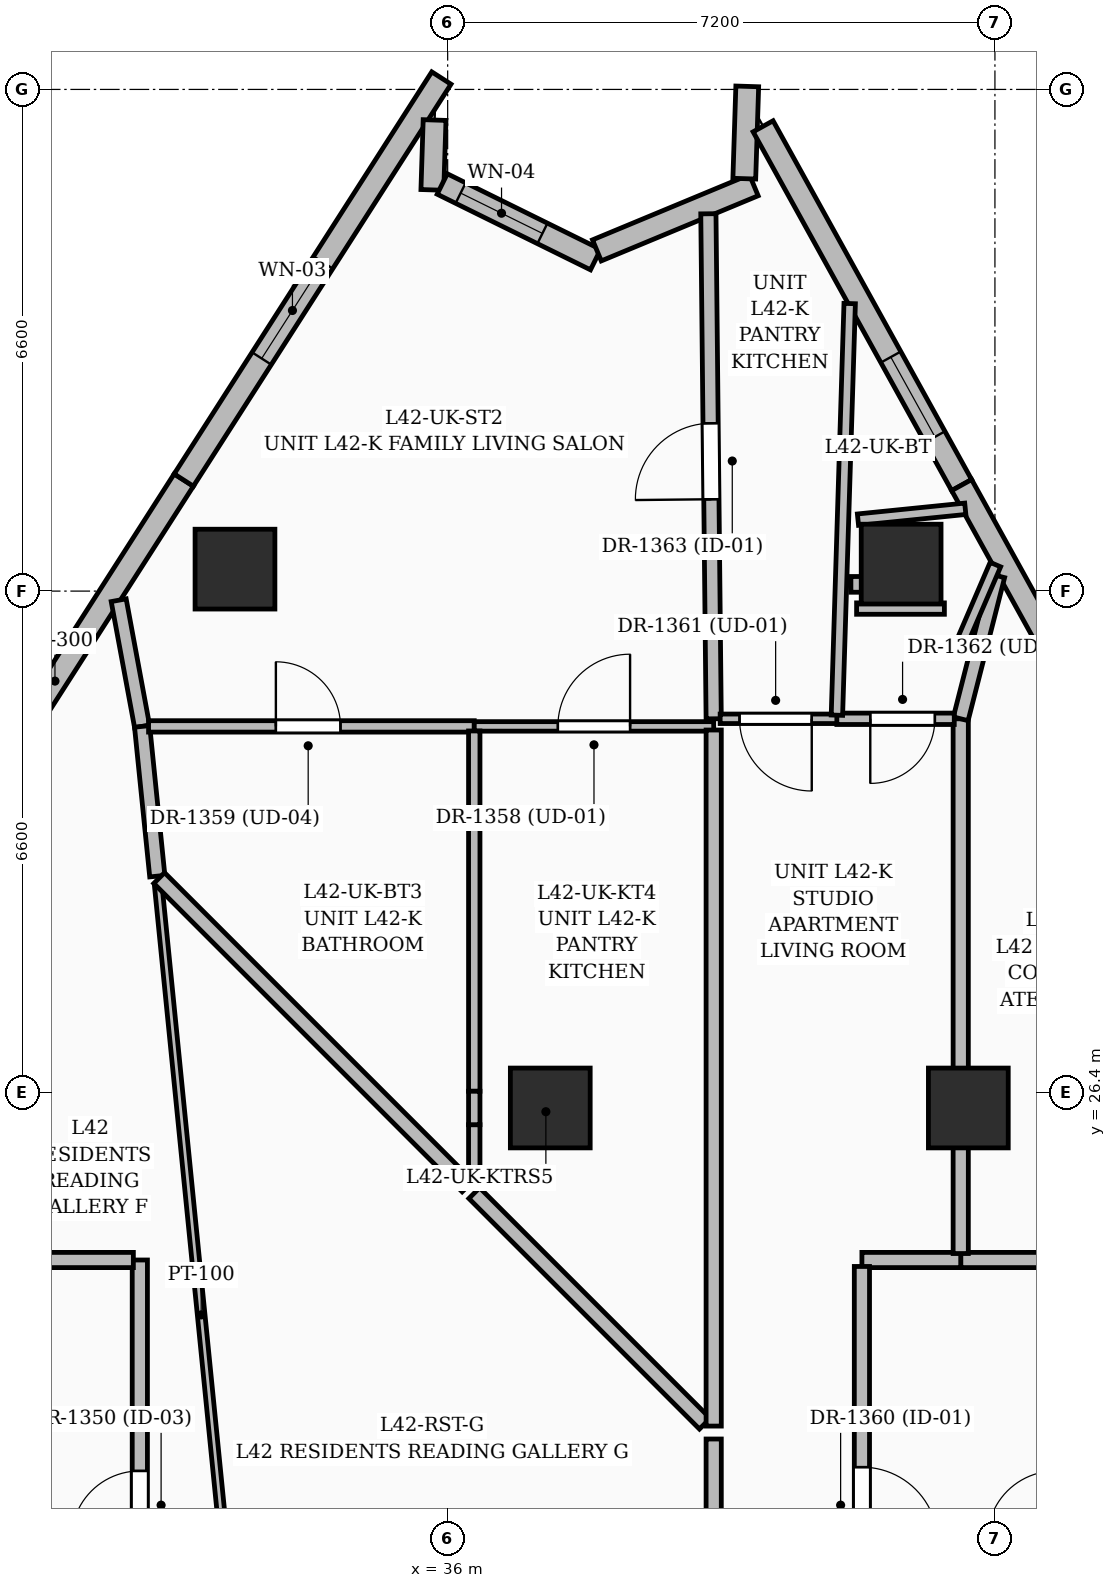
"""IFC4 building model, lengths in metres.
Left out: names, types, materials, properties, quantities, classifications, styles, units other than length and angle.
Written with IfcOpenShell. Run it as: python <this file> out.ifc"""

import sys

from ifc_helpers import new_model, si_unit, direction, frame, frame_2d, origin, origin_2d, place, context, subcontext, project, spatial, rectangle, extrude, element, fill, save


model = new_model("IFC4")
c1 = context("Model", 3, precision=1e-05, world=origin(), true_north=direction((0.0, 1.0)))
c2 = subcontext(c1, "Body", "Model", "MODEL_VIEW")
j1 = project(units=[si_unit("LENGTHUNIT", "METRE"), si_unit("PLANEANGLEUNIT", "RADIAN")], contexts=[c1])
p1 = place(None, origin())
s1 = spatial("IfcSite", under=j1, at=p1, CompositionType="ELEMENT")
p2 = place(p1, origin())
s2 = spatial("IfcBuilding", under=s1, at=p2, CompositionType="ELEMENT")
p3 = place(p2, frame((0.0, 0.0, 164.4)))
s3 = spatial("IfcBuildingStorey", under=s2, at=p3, CompositionType="ELEMENT", Elevation=164.4)
for number, where, z_axis, x_axis in (
    (1, (42.85, 26.2, 0.0), (0.0, 0.0, 1.0), (1.0, 0.0, 0.0)),
    (2, (37.35, 26.2, 0.0), (0.0, 0.0, 1.0), (1.0, 0.0, 0.0)),
    (3, (41.966, 33.355, 0.0), (0.0, 0.0, 1.0), (1.0, 0.0, 0.0)),
    (4, (33.202, 33.289, 0.0), (0.0, 0.0, 1.0), (1.0, 0.0, 0.0)),
):
    element("IfcColumn", number, at=place(p3, frame(where, z_axis=z_axis, x_axis=x_axis)), inside=s3, PredefinedType="COLUMN", context=c2, shape_type="SweptSolid", body=[
        extrude(rectangle(XDim=1.05, YDim=1.05, at=origin_2d()), origin(), (0.0, 0.0, 1.0), 3.6),
    ])
p4 = place(p3, frame((29.139, 29.171, 0.0), z_axis=(0.0, 0.0, 1.0), x_axis=(0.539533329528, 0.841964242904, 0.0)))
e5 = element("IfcWall", 5, at=p4, inside=s3, PredefinedType="SOLIDWALL", context=c2, shape_type="SweptSolid", body=[
    extrude(rectangle(XDim=6.282, YDim=0.3, at=frame_2d((3.141, 0.0))), origin(), (0.0, 0.0, 1.0), 3.35),
])
p5 = place(p3, frame((32.528, 34.461, 0.0), z_axis=(0.0, 0.0, 1.0), x_axis=(0.539505778621, 0.841981896976, 0.0)))
e6 = element("IfcWall", 6, at=p5, inside=s3, PredefinedType="SOLIDWALL", context=c2, shape_type="SweptSolid", body=[
    extrude(rectangle(XDim=6.282, YDim=0.3, at=frame_2d((3.141, 0.0))), origin(), (0.0, 0.0, 1.0), 3.35),
])
p6 = place(p5, frame((1.9, 0.0, 0.6)))
e7 = element("IfcOpeningElement", 7, at=p6, cuts=e6, PredefinedType="OPENING", context=c2, shape_type="SweptSolid", body=[
    extrude(rectangle(XDim=1.5, YDim=2.1, at=frame_2d((0.75, 1.05))), frame((0.0, 0.16, 0.0), z_axis=(0.0, -1.0, 0.0), x_axis=(1.0, 0.0, 0.0)), (0.0, 0.0, 1.0), 0.32),
])
p7 = place(p3, frame((35.828, 39.197, 0.0), z_axis=(0.0, 0.0, 1.0), x_axis=(-0.03185633333, -0.999492458214, 0.0)))
e8 = element("IfcWall", 8, at=p7, inside=s3, PredefinedType="SOLIDWALL", context=c2, shape_type="SweptSolid", body=[
    extrude(rectangle(XDim=0.92, YDim=0.3, at=frame_2d((0.46, 0.0))), origin(), (0.0, 0.0, 1.0), 3.35),
])
p8 = place(p3, frame((35.928, 38.356, 0.0), z_axis=(0.0, 0.0, 1.0), x_axis=(0.896845505116, -0.442343915922, 0.0)))
e9 = element("IfcWall", 9, at=p8, inside=s3, PredefinedType="SOLIDWALL", context=c2, shape_type="SweptSolid", body=[
    extrude(rectangle(XDim=2.249, YDim=0.3, at=frame_2d((1.125, 0.0))), origin(), (0.0, 0.0, 1.0), 3.35),
])
p9 = place(p8, frame((0.27, 0.0, 0.8)))
e10 = element("IfcOpeningElement", 10, at=p9, cuts=e9, PredefinedType="OPENING", context=c2, shape_type="SweptSolid", body=[
    extrude(rectangle(XDim=1.2, YDim=1.8, at=frame_2d((0.6, 0.9))), frame((0.0, 0.16, 0.0), z_axis=(0.0, -1.0, 0.0), x_axis=(1.0, 0.0, 0.0)), (0.0, 0.0, 1.0), 0.32),
])
p10 = place(p3, frame((37.963, 37.482, 0.0), z_axis=(0.0, 0.0, 1.0), x_axis=(0.923538383056, 0.383506003892, 0.0)))
e11 = element("IfcWall", 11, at=p10, inside=s3, PredefinedType="SOLIDWALL", context=c2, shape_type="SweptSolid", body=[
    extrude(rectangle(XDim=2.235, YDim=0.3, at=frame_2d((1.118, 0.0))), origin(), (0.0, 0.0, 1.0), 3.35),
])
p11 = place(p3, frame((39.903, 38.426, 0.0), z_axis=(0.0, 0.0, 1.0), x_axis=(0.031962743503, 0.999489060985, 0.0)))
e12 = element("IfcWall", 12, at=p11, inside=s3, PredefinedType="SOLIDWALL", context=c2, shape_type="SweptSolid", body=[
    extrude(rectangle(XDim=1.215, YDim=0.3, at=frame_2d((0.607, 0.0))), origin(), (0.0, 0.0, 1.0), 3.35),
])
p12 = place(p3, frame((40.15, 39.115, 0.0), z_axis=(0.0, 0.0, 1.0), x_axis=(0.484220621964, -0.874945935052, 0.0)))
e13 = element("IfcWall", 13, at=p12, inside=s3, PredefinedType="SOLIDWALL", context=c2, shape_type="SweptSolid", body=[
    extrude(rectangle(XDim=5.395, YDim=0.3, at=frame_2d((2.697, 0.0))), origin(), (0.0, 0.0, 1.0), 3.35),
])
p13 = place(p12, frame((3.47, 0.0, 0.8)))
e14 = element("IfcOpeningElement", 14, at=p13, cuts=e13, PredefinedType="OPENING", context=c2, shape_type="SweptSolid", body=[
    extrude(rectangle(XDim=1.2, YDim=1.8, at=frame_2d((0.6, 0.9))), frame((0.0, 0.16, 0.0), z_axis=(0.0, -1.0, 0.0), x_axis=(1.0, 0.0, 0.0)), (0.0, 0.0, 1.0), 0.32),
])
p14 = place(p3, frame((42.762, 34.395, 0.0), z_axis=(0.0, 0.0, 1.0), x_axis=(0.484157246346, -0.874981005972, 0.0)))
e15 = element("IfcWall", 15, at=p14, inside=s3, PredefinedType="SOLIDWALL", context=c2, shape_type="SweptSolid", body=[
    extrude(rectangle(XDim=5.974, YDim=0.3, at=frame_2d((2.987, 0.0))), origin(), (0.0, 0.0, 1.0), 3.35),
])
p15 = place(p14, frame((2.525, 0.0, 0.6)))
e16 = element("IfcOpeningElement", 16, at=p15, cuts=e15, PredefinedType="OPENING", context=c2, shape_type="SweptSolid", body=[
    extrude(rectangle(XDim=1.5, YDim=2.1, at=frame_2d((0.75, 1.05))), frame((0.0, 0.16, 0.0), z_axis=(0.0, -1.0, 0.0), x_axis=(1.0, 0.0, 0.0)), (0.0, 0.0, 1.0), 0.32),
])
p16 = place(p3, frame((31.95, 17.835, 0.0), z_axis=(0.0, 0.0, 1.0), x_axis=(0.0, 1.0, 0.0)))
e17 = element("IfcWall", 17, at=p16, inside=s3, PredefinedType="PARTITIONING", context=c2, shape_type="SweptSolid", body=[
    extrude(rectangle(XDim=6.365, YDim=0.2, at=frame_2d((3.183, 0.0))), origin(), (0.0, 0.0, 1.0), 2.393),
])
p17 = place(p16, frame((2.69, 0.0, 0.0)))
e18 = element("IfcOpeningElement", 18, at=p17, cuts=e17, PredefinedType="OPENING", context=c2, shape_type="SweptSolid", body=[
    extrude(rectangle(XDim=0.9, YDim=2.1, at=frame_2d((0.45, 1.05))), frame((0.0, 0.11, 0.0), z_axis=(0.0, -1.0, 0.0), x_axis=(1.0, 0.0, 0.0)), (0.0, 0.0, 1.0), 0.22),
])
p18 = place(p3, frame((31.865, 24.2, 0.0), z_axis=(0.0, 0.0, 1.0), x_axis=(-1.0, 0.0, 0.0)))
e19 = element("IfcWall", 19, at=p18, inside=s3, PredefinedType="PARTITIONING", context=c2, shape_type="SweptSolid", body=[
    extrude(rectangle(XDim=1.765, YDim=0.2, at=frame_2d((0.882, 0.0))), origin(), (0.0, 0.0, 1.0), 2.712),
])
p19 = place(p3, frame((43.915, 24.2, 0.0), z_axis=(0.0, 0.0, 1.0), x_axis=(-1.0, 0.0, 0.0)))
e20 = element("IfcWall", 20, at=p19, inside=s3, PredefinedType="PARTITIONING", context=c2, shape_type="SweptSolid", body=[
    extrude(rectangle(XDim=1.165, YDim=0.2, at=frame_2d((0.583, 0.0))), origin(), (0.0, 0.0, 1.0), 2.436),
])
p20 = place(p3, frame((42.75, 24.2, 0.0), z_axis=(0.0, 0.0, 1.0), x_axis=(-1.0, 0.0, 0.0)))
e21 = element("IfcWall", 21, at=p20, inside=s3, PredefinedType="PARTITIONING", context=c2, shape_type="SweptSolid", body=[
    extrude(rectangle(XDim=1.3, YDim=0.2, at=frame_2d((0.65, 0.0))), origin(), (0.0, 0.0, 1.0), 3.35),
])
p21 = place(p3, frame((41.45, 24.115, 0.0), z_axis=(0.0, 0.0, 1.0), x_axis=(0.0, -1.0, 0.0)))
e22 = element("IfcWall", 22, at=p21, inside=s3, PredefinedType="PARTITIONING", context=c2, shape_type="SweptSolid", body=[
    extrude(rectangle(XDim=6.365, YDim=0.2, at=frame_2d((3.183, 0.0))), origin(), (0.0, 0.0, 1.0), 3.35),
])
p22 = place(p21, frame((2.64, 0.0, 0.0)))
e23 = element("IfcOpeningElement", 23, at=p22, cuts=e22, PredefinedType="OPENING", context=c2, shape_type="SweptSolid", body=[
    extrude(rectangle(XDim=1.0, YDim=2.2, at=frame_2d((0.5, 1.1))), frame((0.0, 0.11, 0.0), z_axis=(0.0, -1.0, 0.0), x_axis=(1.0, 0.0, 0.0)), (0.0, 0.0, 1.0), 0.22),
])
p23 = place(p3, frame((33.322, 17.835, 0.0), z_axis=(0.0, 0.0, 1.0), x_axis=(-0.099510112586, 0.995036550833, 0.0)))
e24 = element("IfcWall", 24, at=p23, inside=s3, PredefinedType="PARTITIONING", context=c2, shape_type="SweptSolid", body=[
    extrude(rectangle(XDim=11.342, YDim=0.1, at=frame_2d((5.671, 0.0))), origin(), (0.0, 0.0, 1.0), 2.393),
])
p24 = place(p3, frame((31.98, 31.22, 0.0), z_axis=(0.0, 0.0, 1.0), x_axis=(-0.18235853501, 0.983232101138, 0.0)))
e25 = element("IfcWall", 25, at=p24, inside=s3, PredefinedType="PARTITIONING", context=c2, shape_type="SweptSolid", body=[
    extrude(rectangle(XDim=1.688, YDim=0.2, at=frame_2d((0.844, 0.0))), origin(), (0.0, 0.0, 1.0), 2.57),
])
p25 = place(p3, frame((32.18, 29.25, 0.0), z_axis=(0.0, 0.0, 1.0), x_axis=(-0.100980739114, 0.994888380839, 0.0)))
e26 = element("IfcWall", 26, at=p25, inside=s3, PredefinedType="PARTITIONING", context=c2, shape_type="SweptSolid", body=[
    extrude(rectangle(XDim=1.98, YDim=0.2, at=frame_2d((0.99, 0.0))), origin(), (0.0, 0.0, 1.0), 2.57),
])
p26 = place(p3, frame((36.262, 25.168, 0.0), z_axis=(0.0, 0.0, 1.0), x_axis=(-0.707128056834, 0.707085504899, 0.0)))
e27 = element("IfcWall", 27, at=p26, inside=s3, PredefinedType="PARTITIONING", context=c2, shape_type="SweptSolid", body=[
    extrude(rectangle(XDim=5.738, YDim=0.2, at=frame_2d((2.869, 0.0))), origin(), (0.0, 0.0, 1.0), 2.712),
])
p27 = place(p3, frame((39.383, 22.047, 0.0), z_axis=(0.0, 0.0, 1.0), x_axis=(-0.707078324468, 0.70713523676, 0.0)))
e28 = element("IfcWall", 28, at=p27, inside=s3, PredefinedType="PARTITIONING", context=c2, shape_type="SweptSolid", body=[
    extrude(rectangle(XDim=4.29, YDim=0.2, at=frame_2d((2.145, 0.0))), origin(), (0.0, 0.0, 1.0), 2.436),
])
p28 = place(p3, frame((39.5, 17.835, 0.0), z_axis=(0.0, 0.0, 1.0), x_axis=(0.0, 1.0, 0.0)))
e29 = element("IfcWall", 29, at=p28, inside=s3, PredefinedType="PARTITIONING", context=c2, shape_type="SweptSolid", body=[
    extrude(rectangle(XDim=4.01, YDim=0.2, at=frame_2d((2.005, 0.0))), origin(), (0.0, 0.0, 1.0), 3.35),
])
p29 = place(p3, frame((42.75, 31.32, 0.0), z_axis=(0.0, 0.0, 1.0), x_axis=(0.0, -1.0, 0.0)))
e30 = element("IfcWall", 30, at=p29, inside=s3, PredefinedType="PARTITIONING", context=c2, shape_type="SweptSolid", body=[
    extrude(rectangle(XDim=7.035, YDim=0.2, at=frame_2d((3.518, 0.0))), origin(), (0.0, 0.0, 1.0), 2.393),
])
p30 = place(p3, frame((43.23, 33.202, 0.0), z_axis=(0.0, 0.0, 1.0), x_axis=(-0.247413379041, -0.968910016396, 0.0)))
e31 = element("IfcWall", 31, at=p30, inside=s3, PredefinedType="PARTITIONING", context=c2, shape_type="SweptSolid", body=[
    extrude(rectangle(XDim=1.942, YDim=0.2, at=frame_2d((0.971, 0.0))), origin(), (0.0, 0.0, 1.0), 2.57),
])
p31 = place(p3, frame((32.065, 31.22, 0.0), z_axis=(0.0, 0.0, 1.0), x_axis=(1.0, 0.0, 0.0)))
e32 = element("IfcWall", 32, at=p31, inside=s3, PredefinedType="PARTITIONING", context=c2, shape_type="SweptSolid", body=[
    extrude(rectangle(XDim=4.285, YDim=0.15, at=frame_2d((2.143, 0.0))), origin(), (0.0, 0.0, 1.0), 2.393),
])
p32 = place(p31, frame((1.675, 0.0, 0.0)))
e33 = element("IfcOpeningElement", 33, at=p32, cuts=e32, PredefinedType="OPENING", context=c2, shape_type="SweptSolid", body=[
    extrude(rectangle(XDim=0.85, YDim=2.1, at=frame_2d((0.425, 1.05))), frame((0.0, 0.085, 0.0), z_axis=(0.0, -1.0, 0.0), x_axis=(1.0, 0.0, 0.0)), (0.0, 0.0, 1.0), 0.17),
])
p33 = place(p3, frame((36.35, 31.22, 0.0), z_axis=(0.0, 0.0, 1.0), x_axis=(1.0, 0.0, 0.0)))
e34 = element("IfcWall", 34, at=p33, inside=s3, PredefinedType="PARTITIONING", context=c2, shape_type="SweptSolid", body=[
    extrude(rectangle(XDim=3.15, YDim=0.125, at=frame_2d((1.575, 0.0))), origin(), (0.0, 0.0, 1.0), 2.712),
])
p34 = place(p33, frame((1.1, 0.0, 0.0)))
e35 = element("IfcOpeningElement", 35, at=p34, cuts=e34, PredefinedType="OPENING", context=c2, shape_type="SweptSolid", body=[
    extrude(rectangle(XDim=0.95, YDim=2.2, at=frame_2d((0.475, 1.1))), frame((0.0, 0.072, 0.0), z_axis=(0.0, -1.0, 0.0), x_axis=(1.0, 0.0, 0.0)), (0.0, 0.0, 1.0), 0.145),
])
p35 = place(p3, frame((39.5, 31.32, 0.0), z_axis=(0.0, 0.0, 1.0), x_axis=(-0.010545456067, 0.999944395132, 0.0)))
e36 = element("IfcWall", 36, at=p35, inside=s3, PredefinedType="PARTITIONING", context=c2, shape_type="SweptSolid", body=[
    extrude(rectangle(XDim=6.645, YDim=0.2, at=frame_2d((3.322, 0.0))), origin(), (0.0, 0.0, 1.0), 2.57),
])
p36 = place(p35, frame((2.889, 0.0, 0.0)))
e37 = element("IfcOpeningElement", 37, at=p36, cuts=e36, PredefinedType="OPENING", context=c2, shape_type="SweptSolid", body=[
    extrude(rectangle(XDim=1.0, YDim=2.2, at=frame_2d((0.5, 1.1))), frame((0.0, 0.11, 0.0), z_axis=(0.0, -1.0, 0.0), x_axis=(1.0, 0.0, 0.0)), (0.0, 0.0, 1.0), 0.22),
])
p37 = place(p3, frame((36.35, 25.165, 0.0), z_axis=(0.0, 0.0, 1.0), x_axis=(0.0, 1.0, 0.0)))
e38 = element("IfcWall", 38, at=p37, inside=s3, PredefinedType="PARTITIONING", context=c2, shape_type="SweptSolid", body=[
    extrude(rectangle(XDim=0.815, YDim=0.15, at=frame_2d((0.407, 0.0))), origin(), (0.0, 0.0, 1.0), 3.35),
])
p38 = place(p3, frame((36.35, 26.42, 0.0), z_axis=(0.0, 0.0, 1.0), x_axis=(0.0, 1.0, 0.0)))
e39 = element("IfcWall", 39, at=p38, inside=s3, PredefinedType="PARTITIONING", context=c2, shape_type="SweptSolid", body=[
    extrude(rectangle(XDim=4.74, YDim=0.15, at=frame_2d((2.37, 0.0))), origin(), (0.0, 0.0, 1.0), 2.393),
])
p39 = place(p3, frame((39.5, 22.015, 0.0), z_axis=(0.0, 0.0, 1.0), x_axis=(0.0, 1.0, 0.0)))
e40 = element("IfcWall", 40, at=p39, inside=s3, PredefinedType="PARTITIONING", context=c2, shape_type="SweptSolid", body=[
    extrude(rectangle(XDim=9.158, YDim=0.2, at=frame_2d((4.579, 0.0))), origin(), (0.0, 0.0, 1.0), 2.436),
])
p40 = place(p3, frame((41.13, 31.32, 0.0), z_axis=(0.0, 0.0, 1.0), x_axis=(-1.0, 0.0, 0.0)))
e41 = element("IfcWall", 41, at=p40, inside=s3, PredefinedType="PARTITIONING", context=c2, shape_type="SweptSolid", body=[
    extrude(rectangle(XDim=1.545, YDim=0.125, at=frame_2d((0.772, 0.0))), origin(), (0.0, 0.0, 1.0), 3.35),
])
p41 = place(p40, frame((0.34, 0.0, 0.0)))
e42 = element("IfcOpeningElement", 42, at=p41, cuts=e41, PredefinedType="OPENING", context=c2, shape_type="SweptSolid", body=[
    extrude(rectangle(XDim=0.95, YDim=2.2, at=frame_2d((0.475, 1.1))), frame((0.0, 0.072, 0.0), z_axis=(0.0, -1.0, 0.0), x_axis=(1.0, 0.0, 0.0)), (0.0, 0.0, 1.0), 0.145),
])
p42 = place(p3, frame((42.665, 31.32, 0.0), z_axis=(0.0, 0.0, 1.0), x_axis=(-1.0, 0.0, 0.0)))
e43 = element("IfcWall", 43, at=p42, inside=s3, PredefinedType="PARTITIONING", context=c2, shape_type="SweptSolid", body=[
    extrude(rectangle(XDim=1.545, YDim=0.15, at=frame_2d((0.772, 0.0))), origin(), (0.0, 0.0, 1.0), 2.393),
])
p43 = place(p42, frame((0.255, 0.0, 0.0)))
e44 = element("IfcOpeningElement", 44, at=p43, cuts=e43, PredefinedType="OPENING", context=c2, shape_type="SweptSolid", body=[
    extrude(rectangle(XDim=0.85, YDim=2.1, at=frame_2d((0.425, 1.05))), frame((0.0, 0.085, 0.0), z_axis=(0.0, -1.0, 0.0), x_axis=(1.0, 0.0, 0.0)), (0.0, 0.0, 1.0), 0.17),
])
p44 = place(p3, frame((41.121, 31.367, 0.0), z_axis=(0.0, 0.0, 1.0), x_axis=(0.03100123119, 0.999519346318, 0.0)))
e45 = element("IfcWall", 45, at=p44, inside=s3, PredefinedType="PARTITIONING", context=c2, shape_type="SweptSolid", body=[
    extrude(rectangle(XDim=5.418, YDim=0.15, at=frame_2d((2.709, 0.0))), origin(), (0.0, 0.0, 1.0), 2.57),
])
p45 = place(p3, frame((36.35, 25.98, 0.0), z_axis=(0.0, 0.0, 1.0), x_axis=(0.0, 1.0, 0.0)))
e46 = element("IfcWall", 46, at=p45, inside=s3, PredefinedType="PARTITIONING", context=c2, shape_type="SweptSolid", body=[
    extrude(rectangle(XDim=0.44, YDim=0.15, at=frame_2d((0.22, 0.0))), origin(), (0.0, 0.0, 1.0), 3.35),
])
p46 = place(p3, frame((42.75, 32.29, 0.0), z_axis=(0.0, 0.0, 1.0), x_axis=(0.3955030033, 0.918464683252, 0.0)))
e47 = element("IfcWall", 47, at=p46, inside=s3, PredefinedType="PARTITIONING", context=c2, shape_type="SweptSolid", body=[
    extrude(rectangle(XDim=1.153, YDim=0.15, at=frame_2d((0.577, 0.0))), origin(), (0.0, 0.0, 1.0), 2.57),
])
p47 = place(p3, frame((42.535, 32.77, 0.0), z_axis=(0.0, 0.0, 1.0), x_axis=(-1.0, 0.0, 0.0)))
e48 = element("IfcWall", 48, at=p47, inside=s3, PredefinedType="PARTITIONING", context=c2, shape_type="SweptSolid", body=[
    extrude(rectangle(XDim=1.155, YDim=0.15, at=frame_2d((0.578, 0.0))), origin(), (0.0, 0.0, 1.0), 2.393),
])
p48 = place(p3, frame((41.38, 32.985, 0.0), z_axis=(0.0, 0.0, 1.0), x_axis=(0.0, 1.0, 0.0)))
e49 = element("IfcWall", 49, at=p48, inside=s3, PredefinedType="PARTITIONING", context=c2, shape_type="SweptSolid", body=[
    extrude(rectangle(XDim=0.207, YDim=0.15, at=frame_2d((0.104, 0.0))), origin(), (0.0, 0.0, 1.0), 2.57),
])
p49 = place(p3, frame((41.398, 33.94, 0.0), z_axis=(0.0, 0.0, 1.0), x_axis=(0.994906914974, 0.10079796891, 0.0)))
e50 = element("IfcWall", 50, at=p49, inside=s3, PredefinedType="PARTITIONING", context=c2, shape_type="SweptSolid", body=[
    extrude(rectangle(XDim=1.419, YDim=0.15, at=frame_2d((0.71, 0.0))), origin(), (0.0, 0.0, 1.0), 3.35),
])
p50 = place(p6, origin())
e51 = element("IfcWindow", 51, at=p50, inside=s3, PartitioningType="SINGLE_PANEL", PredefinedType="WINDOW", context=c2, shape_type="SweptSolid", body=[
    extrude(rectangle(XDim=1.5, YDim=2.1, at=frame_2d((0.75, 1.05))), frame((0.0, 0.03, 0.0), z_axis=(0.0, -1.0, 0.0), x_axis=(1.0, 0.0, 0.0)), (0.0, 0.0, 1.0), 0.06),
])
fill(e7, e51)
p51 = place(p9, origin())
e52 = element("IfcWindow", 52, at=p51, inside=s3, PartitioningType="SINGLE_PANEL", PredefinedType="WINDOW", context=c2, shape_type="SweptSolid", body=[
    extrude(rectangle(XDim=1.2, YDim=1.8, at=frame_2d((0.6, 0.9))), frame((0.0, 0.03, 0.0), z_axis=(0.0, -1.0, 0.0), x_axis=(1.0, 0.0, 0.0)), (0.0, 0.0, 1.0), 0.06),
])
fill(e10, e52)
p52 = place(p13, origin())
e53 = element("IfcWindow", 53, at=p52, inside=s3, PartitioningType="SINGLE_PANEL", PredefinedType="WINDOW", context=c2, shape_type="SweptSolid", body=[
    extrude(rectangle(XDim=1.2, YDim=1.8, at=frame_2d((0.6, 0.9))), frame((0.0, 0.03, 0.0), z_axis=(0.0, -1.0, 0.0), x_axis=(1.0, 0.0, 0.0)), (0.0, 0.0, 1.0), 0.06),
])
fill(e14, e53)
p53 = place(p17, origin())
e54 = element("IfcDoor", 54, at=p53, inside=s3, OperationType="SINGLE_SWING_LEFT", PredefinedType="DOOR", context=c2, shape_type="SweptSolid", body=[
    extrude(rectangle(XDim=0.9, YDim=2.1, at=frame_2d((0.45, 1.05))), frame((0.0, 0.025, 0.0), z_axis=(0.0, -1.0, 0.0), x_axis=(1.0, 0.0, 0.0)), (0.0, 0.0, 1.0), 0.05),
])
fill(e18, e54)
p54 = place(p34, origin())
e55 = element("IfcDoor", 55, at=p54, inside=s3, OperationType="SINGLE_SWING_RIGHT", PredefinedType="DOOR", context=c2, shape_type="SweptSolid", body=[
    extrude(rectangle(XDim=0.95, YDim=2.2, at=frame_2d((0.475, 1.1))), frame((0.0, 0.025, 0.0), z_axis=(0.0, -1.0, 0.0), x_axis=(1.0, 0.0, 0.0)), (0.0, 0.0, 1.0), 0.05),
])
fill(e35, e55)
p55 = place(p32, origin())
e56 = element("IfcDoor", 56, at=p55, inside=s3, OperationType="SINGLE_SWING_LEFT", PredefinedType="DOOR", context=c2, shape_type="SweptSolid", body=[
    extrude(rectangle(XDim=0.85, YDim=2.1, at=frame_2d((0.425, 1.05))), frame((0.0, 0.025, 0.0), z_axis=(0.0, -1.0, 0.0), x_axis=(1.0, 0.0, 0.0)), (0.0, 0.0, 1.0), 0.05),
])
fill(e33, e56)
p56 = place(p22, origin())
e57 = element("IfcDoor", 57, at=p56, inside=s3, OperationType="SINGLE_SWING_RIGHT", PredefinedType="DOOR", context=c2, shape_type="SweptSolid", body=[
    extrude(rectangle(XDim=1.0, YDim=2.2, at=frame_2d((0.5, 1.1))), frame((0.0, 0.025, 0.0), z_axis=(0.0, -1.0, 0.0), x_axis=(1.0, 0.0, 0.0)), (0.0, 0.0, 1.0), 0.05),
])
fill(e23, e57)
p57 = place(p41, origin())
e58 = element("IfcDoor", 58, at=p57, inside=s3, OperationType="SINGLE_SWING_LEFT", PredefinedType="DOOR", context=c2, shape_type="SweptSolid", body=[
    extrude(rectangle(XDim=0.95, YDim=2.2, at=frame_2d((0.475, 1.1))), frame((0.0, 0.025, 0.0), z_axis=(0.0, -1.0, 0.0), x_axis=(1.0, 0.0, 0.0)), (0.0, 0.0, 1.0), 0.05),
])
fill(e42, e58)
p58 = place(p43, origin())
e59 = element("IfcDoor", 59, at=p58, inside=s3, OperationType="SINGLE_SWING_RIGHT", PredefinedType="DOOR", context=c2, shape_type="SweptSolid", body=[
    extrude(rectangle(XDim=0.85, YDim=2.1, at=frame_2d((0.425, 1.05))), frame((0.0, 0.025, 0.0), z_axis=(0.0, -1.0, 0.0), x_axis=(1.0, 0.0, 0.0)), (0.0, 0.0, 1.0), 0.05),
])
fill(e44, e59)
p59 = place(p36, origin())
e60 = element("IfcDoor", 60, at=p59, inside=s3, OperationType="SINGLE_SWING_LEFT", PredefinedType="DOOR", context=c2, shape_type="SweptSolid", body=[
    extrude(rectangle(XDim=1.0, YDim=2.2, at=frame_2d((0.5, 1.1))), frame((0.0, 0.025, 0.0), z_axis=(0.0, -1.0, 0.0), x_axis=(1.0, 0.0, 0.0)), (0.0, 0.0, 1.0), 0.05),
])
fill(e37, e60)
save(model, sys.argv[1])
